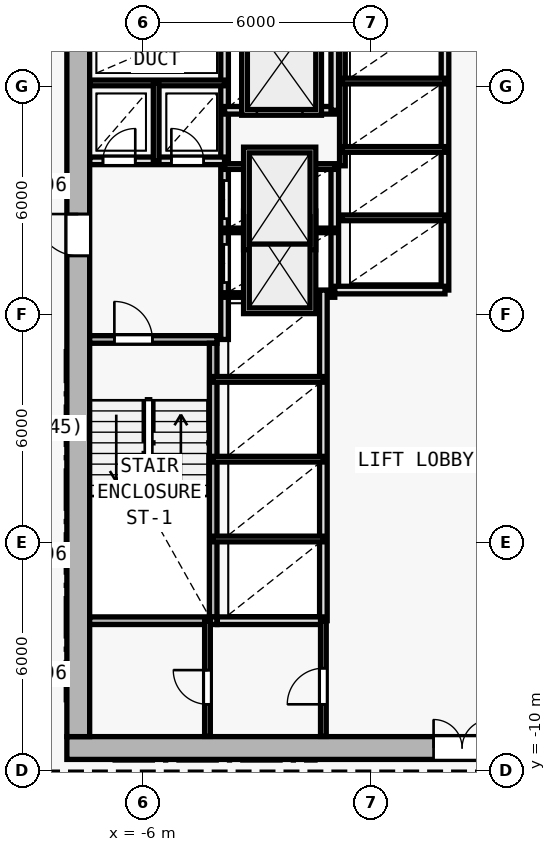
"""IFC4 building model, lengths in metres.
Left out: names, types, materials, properties, quantities, classifications, styles, units other than length and angle.
Written with IfcOpenShell. Run it as: python <this file> out.ifc"""

import sys

from ifc_helpers import new_model, si_unit, direction, frame, frame_2d, origin, origin_2d, place, context, subcontext, project, spatial, rectangle, i_section, extrude, element, fill, save


model = new_model("IFC4")
c1 = context("Model", 3, precision=1e-05, world=origin(), true_north=direction((0.0, 1.0)))
c2 = subcontext(c1, "Body", "Model", "MODEL_VIEW")
j1 = project(units=[si_unit("LENGTHUNIT", "METRE"), si_unit("PLANEANGLEUNIT", "RADIAN")], contexts=[c1])
p1 = place(None, origin())
s1 = spatial("IfcSite", under=j1, at=p1, CompositionType="ELEMENT")
p2 = place(p1, origin())
s2 = spatial("IfcBuilding", under=s1, at=p2, CompositionType="ELEMENT")
p3 = place(p2, frame((0.0, 0.0, 62.4)))
s3 = spatial("IfcBuildingStorey", under=s2, at=p3, CompositionType="ELEMENT", Elevation=62.4)
for number, where, z_axis, x_axis in (
    (1, (-7.7, -9.4, 0.0), (0.0, 0.0, 1.0), (1.0, 0.0, 0.0)),
    (2, (0.0, -9.4, 0.0), (0.0, 0.0, 1.0), (1.0, 0.0, 0.0)),
    (3, (-7.7, 2.0, 0.0), (0.0, 0.0, 1.0), (1.0, 0.0, 0.0)),
):
    element("IfcColumn", number, at=place(p3, frame(where, z_axis=z_axis, x_axis=x_axis)), inside=s3, PredefinedType="COLUMN", context=c2, shape_type="SweptSolid", body=[
        extrude(i_section(OverallWidth=0.416, OverallDepth=0.446, WebThickness=0.025, FlangeThickness=0.04, FilletRadius=0.015, at=origin_2d()), origin(), (0.0, 0.0, 1.0), 3.6),
    ])
p4 = place(p3, frame((-8.0, -9.4, 0.0), z_axis=(0.0, 0.0, 1.0), x_axis=(1.0, 0.0, 0.0)))
e4 = element("IfcWall", 4, at=p4, inside=s3, PredefinedType="SHEAR", context=c2, shape_type="SweptSolid", body=[
    extrude(rectangle(XDim=16.0, YDim=0.6, at=frame_2d((8.0, 0.0))), origin(), (0.0, 0.0, 1.0), 3.35),
])
p5 = place(p4, frame((9.65, 0.0, 0.0)))
e5 = element("IfcOpeningElement", 5, at=p5, cuts=e4, PredefinedType="OPENING", context=c2, shape_type="SweptSolid", body=[
    extrude(rectangle(XDim=1.5, YDim=2.2, at=frame_2d((0.75, 1.1))), frame((0.0, 0.31, 0.0), z_axis=(0.0, -1.0, 0.0), x_axis=(1.0, 0.0, 0.0)), (0.0, 0.0, 1.0), 0.62),
])
p6 = place(p3, frame((-7.7, -9.1, 0.0), z_axis=(0.0, 0.0, 1.0), x_axis=(0.0, 1.0, 0.0)))
e6 = element("IfcWall", 6, at=p6, inside=s3, PredefinedType="SHEAR", context=c2, shape_type="SweptSolid", body=[
    extrude(rectangle(XDim=19.0, YDim=0.6, at=frame_2d((9.5, 0.0))), origin(), (0.0, 0.0, 1.0), 3.35),
])
p7 = place(p6, frame((12.65, 0.0, 0.0)))
e7 = element("IfcOpeningElement", 7, at=p7, cuts=e6, PredefinedType="OPENING", context=c2, shape_type="SweptSolid", body=[
    extrude(rectangle(XDim=1.1, YDim=2.15, at=frame_2d((0.55, 1.075))), frame((0.0, 0.31, 0.0), z_axis=(0.0, -1.0, 0.0), x_axis=(1.0, 0.0, 0.0)), (0.0, 0.0, 1.0), 0.62),
])
p8 = place(p3, frame((-7.4, 1.35, 0.0), z_axis=(0.0, 0.0, 1.0), x_axis=(1.0, 0.0, 0.0)))
e8 = element("IfcWall", 8, at=p8, inside=s3, PredefinedType="SOLIDWALL", context=c2, shape_type="SweptSolid", body=[
    extrude(rectangle(XDim=3.35, YDim=0.2, at=frame_2d((1.675, 0.0))), origin(), (0.0, 0.0, 1.0), 3.35),
])
p9 = place(p8, frame((0.65, 0.0, 0.0)))
e9 = element("IfcOpeningElement", 9, at=p9, cuts=e8, PredefinedType="OPENING", context=c2, shape_type="SweptSolid", body=[
    extrude(rectangle(XDim=1.0, YDim=2.15, at=frame_2d((0.5, 1.075))), frame((0.0, 0.11, 0.0), z_axis=(0.0, -1.0, 0.0), x_axis=(1.0, 0.0, 0.0)), (0.0, 0.0, 1.0), 0.22),
])
p10 = place(p3, frame((-4.15, -5.95, 0.0), z_axis=(0.0, 0.0, 1.0), x_axis=(0.0, 1.0, 0.0)))
e10 = element("IfcWall", 10, at=p10, inside=s3, PredefinedType="SOLIDWALL", context=c2, shape_type="SweptSolid", body=[
    extrude(rectangle(XDim=7.2, YDim=0.2, at=frame_2d((3.6, 0.0))), origin(), (0.0, 0.0, 1.0), 3.35),
])
p11 = place(p3, frame((-3.85, 1.35, 0.0), z_axis=(0.0, 0.0, 1.0), x_axis=(0.0, 1.0, 0.0)))
e11 = element("IfcWall", 11, at=p11, inside=s3, PredefinedType="SOLIDWALL", context=c2, shape_type="SweptSolid", body=[
    extrude(rectangle(XDim=8.545, YDim=0.2, at=frame_2d((4.272, 0.0))), origin(), (0.0, 0.0, 1.0), 3.35),
])
p12 = place(p11, frame((1.5, 0.0, 0.0)))
e12 = element("IfcOpeningElement", 12, at=p12, cuts=e11, PredefinedType="OPENING", context=c2, shape_type="SweptSolid", body=[
    extrude(rectangle(XDim=1.0, YDim=2.15, at=frame_2d((0.5, 1.075))), frame((0.0, 0.11, 0.0), z_axis=(0.0, -1.0, 0.0), x_axis=(1.0, 0.0, 0.0)), (0.0, 0.0, 1.0), 0.22),
])
p13 = place(p11, frame((3.18, 0.0, 0.0)))
e13 = element("IfcOpeningElement", 13, at=p13, cuts=e11, PredefinedType="OPENING", context=c2, shape_type="SweptSolid", body=[
    extrude(rectangle(XDim=1.0, YDim=2.15, at=frame_2d((0.5, 1.075))), frame((0.0, 0.11, 0.0), z_axis=(0.0, -1.0, 0.0), x_axis=(1.0, 0.0, 0.0)), (0.0, 0.0, 1.0), 0.22),
])
p14 = place(p3, frame((-7.395, 6.05, 0.0), z_axis=(0.0, 0.0, 1.0), x_axis=(1.0, 0.0, 0.0)))
e14 = element("IfcWall", 14, at=p14, inside=s3, PredefinedType="SOLIDWALL", context=c2, shape_type="SweptSolid", body=[
    extrude(rectangle(XDim=3.545, YDim=0.2, at=frame_2d((1.772, 0.0))), origin(), (0.0, 0.0, 1.0), 3.35),
])
p15 = place(p14, frame((0.345, 0.0, 0.0)))
e15 = element("IfcOpeningElement", 15, at=p15, cuts=e14, PredefinedType="OPENING", context=c2, shape_type="SweptSolid", body=[
    extrude(rectangle(XDim=0.85, YDim=2.1, at=frame_2d((0.425, 1.05))), frame((0.0, 0.11, 0.0), z_axis=(0.0, -1.0, 0.0), x_axis=(1.0, 0.0, 0.0)), (0.0, 0.0, 1.0), 0.22),
])
p16 = place(p14, frame((2.145, 0.0, 0.0)))
e16 = element("IfcOpeningElement", 16, at=p16, cuts=e14, PredefinedType="OPENING", context=c2, shape_type="SweptSolid", body=[
    extrude(rectangle(XDim=0.85, YDim=2.1, at=frame_2d((0.425, 1.05))), frame((0.0, 0.11, 0.0), z_axis=(0.0, -1.0, 0.0), x_axis=(1.0, 0.0, 0.0)), (0.0, 0.0, 1.0), 0.22),
])
p17 = place(p3, frame((-7.395, 8.1, 0.0), z_axis=(0.0, 0.0, 1.0), x_axis=(1.0, 0.0, 0.0)))
e17 = element("IfcWall", 17, at=p17, inside=s3, PredefinedType="PARTITIONING", context=c2, shape_type="SweptSolid", body=[
    extrude(rectangle(XDim=3.545, YDim=0.15, at=frame_2d((1.772, 0.0))), origin(), (0.0, 0.0, 1.0), 3.35),
])
p18 = place(p3, frame((-5.65, 6.05, 0.0), z_axis=(0.0, 0.0, 1.0), x_axis=(0.0, 1.0, 0.0)))
e18 = element("IfcWall", 18, at=p18, inside=s3, PredefinedType="PARTITIONING", context=c2, shape_type="SweptSolid", body=[
    extrude(rectangle(XDim=2.05, YDim=0.15, at=frame_2d((1.025, 0.0))), origin(), (0.0, 0.0, 1.0), 3.35),
])
p19 = place(p3, frame((-0.95, 2.65, 0.0), z_axis=(0.0, 0.0, 1.0), x_axis=(0.0, 1.0, 0.0)))
e19 = element("IfcWall", 19, at=p19, inside=s3, PredefinedType="SOLIDWALL", context=c2, shape_type="SweptSolid", body=[
    extrude(rectangle(XDim=3.27, YDim=0.2, at=frame_2d((1.635, 0.0))), origin(), (0.0, 0.0, 1.0), 3.35),
])
for number, where, z_axis, x_axis in (
    (20, (-3.85, 2.52, 0.0), (0.0, 0.0, 1.0), (1.0, 0.0, 0.0)),
    (21, (-3.85, 4.22, 0.0), (0.0, 0.0, 1.0), (1.0, 0.0, 0.0)),
):
    element("IfcWall", number, at=place(p3, frame(where, z_axis=z_axis, x_axis=x_axis)), inside=s3, PredefinedType="PARTITIONING", context=c2, shape_type="SweptSolid", body=[
        extrude(rectangle(XDim=2.9, YDim=0.12, at=frame_2d((1.45, 0.0))), origin(), (0.0, 0.0, 1.0), 3.35),
    ])
p20 = place(p3, frame((-3.85, 5.9, 0.0), z_axis=(0.0, 0.0, 1.0), x_axis=(1.0, 0.0, 0.0)))
e22 = element("IfcWall", 22, at=p20, inside=s3, PredefinedType="PARTITIONING", context=c2, shape_type="SweptSolid", body=[
    extrude(rectangle(XDim=2.9, YDim=0.15, at=frame_2d((1.45, 0.0))), origin(), (0.0, 0.0, 1.0), 3.35),
])
p21 = place(p3, frame((-3.85, 7.38, 0.0), z_axis=(0.0, 0.0, 1.0), x_axis=(1.0, 0.0, 0.0)))
e23 = element("IfcWall", 23, at=p21, inside=s3, PredefinedType="SOLIDWALL", context=c2, shape_type="SweptSolid", body=[
    extrude(rectangle(XDim=2.9, YDim=0.2, at=frame_2d((1.45, 0.0))), origin(), (0.0, 0.0, 1.0), 3.35),
])
p22 = place(p21, frame((0.85, 0.0, 0.0)))
e24 = element("IfcOpeningElement", 24, at=p22, cuts=e23, PredefinedType="OPENING", context=c2, shape_type="SweptSolid", body=[
    extrude(rectangle(XDim=1.2, YDim=2.2, at=frame_2d((0.6, 1.1))), frame((0.0, 0.11, 0.0), z_axis=(0.0, -1.0, 0.0), x_axis=(1.0, 0.0, 0.0)), (0.0, 0.0, 1.0), 0.22),
])
p23 = place(p3, frame((-0.95, 7.38, 0.0), z_axis=(0.0, 0.0, 1.0), x_axis=(0.0, 1.0, 0.0)))
e25 = element("IfcWall", 25, at=p23, inside=s3, PredefinedType="SOLIDWALL", context=c2, shape_type="SweptSolid", body=[
    extrude(rectangle(XDim=2.515, YDim=0.2, at=frame_2d((1.258, 0.0))), origin(), (0.0, 0.0, 1.0), 3.35),
])
p24 = place(p3, frame((-1.25, -6.05, 0.0), z_axis=(0.0, 0.0, 1.0), x_axis=(0.0, 1.0, 0.0)))
e26 = element("IfcWall", 26, at=p24, inside=s3, PredefinedType="SOLIDWALL", context=c2, shape_type="SweptSolid", body=[
    extrude(rectangle(XDim=8.7, YDim=0.2, at=frame_2d((4.35, 0.0))), origin(), (0.0, 0.0, 1.0), 3.35),
])
for number, where, z_axis, x_axis in (
    (27, (-4.15, -3.9, 0.0), (0.0, 0.0, 1.0), (1.0, 0.0, 0.0)),
    (28, (-4.15, -1.8, 0.0), (0.0, 0.0, 1.0), (1.0, 0.0, 0.0)),
    (29, (-4.15, 0.3, 0.0), (0.0, 0.0, 1.0), (1.0, 0.0, 0.0)),
):
    element("IfcWall", number, at=place(p3, frame(where, z_axis=z_axis, x_axis=x_axis)), inside=s3, PredefinedType="PARTITIONING", context=c2, shape_type="SweptSolid", body=[
        extrude(rectangle(XDim=2.9, YDim=0.15, at=frame_2d((1.45, 0.0))), origin(), (0.0, 0.0, 1.0), 3.35),
    ])
p25 = place(p3, frame((1.95, 2.65, 0.0), z_axis=(0.0, 0.0, 1.0), x_axis=(0.0, 1.0, 0.0)))
e30 = element("IfcWall", 30, at=p25, inside=s3, PredefinedType="SOLIDWALL", context=c2, shape_type="SweptSolid", body=[
    extrude(rectangle(XDim=7.245, YDim=0.2, at=frame_2d((3.623, 0.0))), origin(), (0.0, 0.0, 1.0), 3.35),
])
p26 = place(p3, frame((-0.95, 2.65, 0.0), z_axis=(0.0, 0.0, 1.0), x_axis=(1.0, 0.0, 0.0)))
e31 = element("IfcWall", 31, at=p26, inside=s3, PredefinedType="SOLIDWALL", context=c2, shape_type="SweptSolid", body=[
    extrude(rectangle(XDim=2.9, YDim=0.2, at=frame_2d((1.45, 0.0))), origin(), (0.0, 0.0, 1.0), 3.35),
])
p27 = place(p3, frame((-0.75, 5.92, 0.0), z_axis=(0.0, 0.0, 1.0), x_axis=(0.0, 1.0, 0.0)))
e32 = element("IfcWall", 32, at=p27, inside=s3, PredefinedType="PARTITIONING", context=c2, shape_type="SweptSolid", body=[
    extrude(rectangle(XDim=3.975, YDim=0.15, at=frame_2d((1.988, 0.0))), origin(), (0.0, 0.0, 1.0), 3.35),
])
for number, where, z_axis, x_axis in (
    (33, (-0.75, 4.55, 0.0), (0.0, 0.0, 1.0), (1.0, 0.0, 0.0)),
    (34, (-0.75, 6.35, 0.0), (0.0, 0.0, 1.0), (1.0, 0.0, 0.0)),
    (35, (-0.75, 8.15, 0.0), (0.0, 0.0, 1.0), (1.0, 0.0, 0.0)),
):
    element("IfcWall", number, at=place(p3, frame(where, z_axis=z_axis, x_axis=x_axis)), inside=s3, PredefinedType="PARTITIONING", context=c2, shape_type="SweptSolid", body=[
        extrude(rectangle(XDim=2.7, YDim=0.15, at=frame_2d((1.35, 0.0))), origin(), (0.0, 0.0, 1.0), 3.35),
    ])
p28 = place(p3, frame((-7.4, -6.05, 0.0), z_axis=(0.0, 0.0, 1.0), x_axis=(1.0, 0.0, 0.0)))
e36 = element("IfcWall", 36, at=p28, inside=s3, PredefinedType="SOLIDWALL", context=c2, shape_type="SweptSolid", body=[
    extrude(rectangle(XDim=3.35, YDim=0.2, at=frame_2d((1.675, 0.0))), origin(), (0.0, 0.0, 1.0), 3.35),
])
p29 = place(p3, frame((-4.04, -6.05, 0.0), z_axis=(0.0, 0.0, 1.0), x_axis=(1.0, 0.0, 0.0)))
e37 = element("IfcWall", 37, at=p29, inside=s3, PredefinedType="SOLIDWALL", context=c2, shape_type="SweptSolid", body=[
    extrude(rectangle(XDim=2.79, YDim=0.2, at=frame_2d((1.395, 0.0))), origin(), (0.0, 0.0, 1.0), 3.35),
])
p30 = place(p3, frame((-1.25, -9.095, 0.0), z_axis=(0.0, 0.0, 1.0), x_axis=(0.0, 1.0, 0.0)))
e38 = element("IfcWall", 38, at=p30, inside=s3, PredefinedType="PARTITIONING", context=c2, shape_type="SweptSolid", body=[
    extrude(rectangle(XDim=3.045, YDim=0.15, at=frame_2d((1.522, 0.0))), origin(), (0.0, 0.0, 1.0), 3.35),
])
p31 = place(p30, frame((0.845, 0.0, 0.0)))
e39 = element("IfcOpeningElement", 39, at=p31, cuts=e38, PredefinedType="OPENING", context=c2, shape_type="SweptSolid", body=[
    extrude(rectangle(XDim=0.95, YDim=2.1, at=frame_2d((0.475, 1.05))), frame((0.0, 0.085, 0.0), z_axis=(0.0, -1.0, 0.0), x_axis=(1.0, 0.0, 0.0)), (0.0, 0.0, 1.0), 0.17),
])
p32 = place(p3, frame((-4.3, -9.095, 0.0), z_axis=(0.0, 0.0, 1.0), x_axis=(0.0, 1.0, 0.0)))
e40 = element("IfcWall", 40, at=p32, inside=s3, PredefinedType="PARTITIONING", context=c2, shape_type="SweptSolid", body=[
    extrude(rectangle(XDim=3.045, YDim=0.15, at=frame_2d((1.522, 0.0))), origin(), (0.0, 0.0, 1.0), 3.35),
])
p33 = place(p32, frame((0.845, 0.0, 0.0)))
e41 = element("IfcOpeningElement", 41, at=p33, cuts=e40, PredefinedType="OPENING", context=c2, shape_type="SweptSolid", body=[
    extrude(rectangle(XDim=0.9, YDim=2.1, at=frame_2d((0.45, 1.05))), frame((0.0, 0.085, 0.0), z_axis=(0.0, -1.0, 0.0), x_axis=(1.0, 0.0, 0.0)), (0.0, 0.0, 1.0), 0.17),
])
p34 = place(p3, frame((-9.86, 8.426, 0.0), z_axis=(0.0, 0.0, 1.0), x_axis=(0.582449511476, 0.812866881218, 0.0)))
e42 = element("IfcWall", 42, at=p34, inside=s3, PredefinedType="PARTITIONING", context=c2, shape_type="SweptSolid", body=[
    extrude(rectangle(XDim=4.84, YDim=0.15, at=frame_2d((2.42, 0.0))), origin(), (0.0, 0.0, 1.0), 2.725),
])
p35 = place(p34, frame((3.074, 0.0, 0.0)))
e43 = element("IfcOpeningElement", 43, at=p35, cuts=e42, PredefinedType="OPENING", context=c2, shape_type="SweptSolid", body=[
    extrude(rectangle(XDim=0.9, YDim=2.1, at=frame_2d((0.45, 1.05))), frame((0.0, 0.085, 0.0), z_axis=(0.0, -1.0, 0.0), x_axis=(1.0, 0.0, 0.0)), (0.0, 0.0, 1.0), 0.17),
])
p36 = place(p5, origin())
e44 = element("IfcDoor", 44, at=p36, inside=s3, OperationType="DOUBLE_DOOR_SINGLE_SWING", PredefinedType="DOOR", context=c2, shape_type="SweptSolid", body=[
    extrude(rectangle(XDim=1.5, YDim=2.2, at=frame_2d((0.75, 1.1))), frame((0.0, 0.025, 0.0), z_axis=(0.0, -1.0, 0.0), x_axis=(1.0, 0.0, 0.0)), (0.0, 0.0, 1.0), 0.05),
])
fill(e5, e44)
p37 = place(p7, origin())
e45 = element("IfcDoor", 45, at=p37, inside=s3, OperationType="SINGLE_SWING_RIGHT", PredefinedType="DOOR", context=c2, shape_type="SweptSolid", body=[
    extrude(rectangle(XDim=1.1, YDim=2.15, at=frame_2d((0.55, 1.075))), frame((0.0, 0.025, 0.0), z_axis=(0.0, -1.0, 0.0), x_axis=(1.0, 0.0, 0.0)), (0.0, 0.0, 1.0), 0.05),
])
fill(e7, e45)
p38 = place(p9, origin())
e46 = element("IfcDoor", 46, at=p38, inside=s3, OperationType="SINGLE_SWING_LEFT", PredefinedType="DOOR", context=c2, shape_type="SweptSolid", body=[
    extrude(rectangle(XDim=1.0, YDim=2.15, at=frame_2d((0.5, 1.075))), frame((0.0, 0.025, 0.0), z_axis=(0.0, -1.0, 0.0), x_axis=(1.0, 0.0, 0.0)), (0.0, 0.0, 1.0), 0.05),
])
fill(e9, e46)
p39 = place(p15, origin())
e47 = element("IfcDoor", 47, at=p39, inside=s3, OperationType="SINGLE_SWING_RIGHT", PredefinedType="DOOR", context=c2, shape_type="SweptSolid", body=[
    extrude(rectangle(XDim=0.85, YDim=2.1, at=frame_2d((0.425, 1.05))), frame((0.0, 0.025, 0.0), z_axis=(0.0, -1.0, 0.0), x_axis=(1.0, 0.0, 0.0)), (0.0, 0.0, 1.0), 0.05),
])
fill(e15, e47)
p40 = place(p16, origin())
e48 = element("IfcDoor", 48, at=p40, inside=s3, OperationType="SINGLE_SWING_LEFT", PredefinedType="DOOR", context=c2, shape_type="SweptSolid", body=[
    extrude(rectangle(XDim=0.85, YDim=2.1, at=frame_2d((0.425, 1.05))), frame((0.0, 0.025, 0.0), z_axis=(0.0, -1.0, 0.0), x_axis=(1.0, 0.0, 0.0)), (0.0, 0.0, 1.0), 0.05),
])
fill(e16, e48)
p41 = place(p22, origin())
e49 = element("IfcDoor", 49, at=p41, inside=s3, OperationType="DOUBLE_DOOR_SLIDING", PredefinedType="DOOR", context=c2, shape_type="SweptSolid", body=[
    extrude(rectangle(XDim=1.2, YDim=2.2, at=frame_2d((0.6, 1.1))), frame((0.0, 0.025, 0.0), z_axis=(0.0, -1.0, 0.0), x_axis=(1.0, 0.0, 0.0)), (0.0, 0.0, 1.0), 0.05),
])
fill(e24, e49)
p42 = place(p12, origin())
e50 = element("IfcDoor", 50, at=p42, inside=s3, OperationType="DOUBLE_DOOR_SLIDING", PredefinedType="DOOR", context=c2, shape_type="SweptSolid", body=[
    extrude(rectangle(XDim=1.0, YDim=2.15, at=frame_2d((0.5, 1.075))), frame((0.0, 0.025, 0.0), z_axis=(0.0, -1.0, 0.0), x_axis=(1.0, 0.0, 0.0)), (0.0, 0.0, 1.0), 0.05),
])
fill(e12, e50)
p43 = place(p13, origin())
e51 = element("IfcDoor", 51, at=p43, inside=s3, OperationType="DOUBLE_DOOR_SLIDING", PredefinedType="DOOR", context=c2, shape_type="SweptSolid", body=[
    extrude(rectangle(XDim=1.0, YDim=2.15, at=frame_2d((0.5, 1.075))), frame((0.0, 0.025, 0.0), z_axis=(0.0, -1.0, 0.0), x_axis=(1.0, 0.0, 0.0)), (0.0, 0.0, 1.0), 0.05),
])
fill(e13, e51)
p44 = place(p31, origin())
e52 = element("IfcDoor", 52, at=p44, inside=s3, OperationType="SINGLE_SWING_LEFT", PredefinedType="DOOR", context=c2, shape_type="SweptSolid", body=[
    extrude(rectangle(XDim=0.95, YDim=2.1, at=frame_2d((0.475, 1.05))), frame((0.0, 0.025, 0.0), z_axis=(0.0, -1.0, 0.0), x_axis=(1.0, 0.0, 0.0)), (0.0, 0.0, 1.0), 0.05),
])
fill(e39, e52)
p45 = place(p33, origin())
e53 = element("IfcDoor", 53, at=p45, inside=s3, OperationType="SINGLE_SWING_RIGHT", PredefinedType="DOOR", context=c2, shape_type="SweptSolid", body=[
    extrude(rectangle(XDim=0.9, YDim=2.1, at=frame_2d((0.45, 1.05))), frame((0.0, 0.025, 0.0), z_axis=(0.0, -1.0, 0.0), x_axis=(1.0, 0.0, 0.0)), (0.0, 0.0, 1.0), 0.05),
])
fill(e41, e53)
save(model, sys.argv[1])
